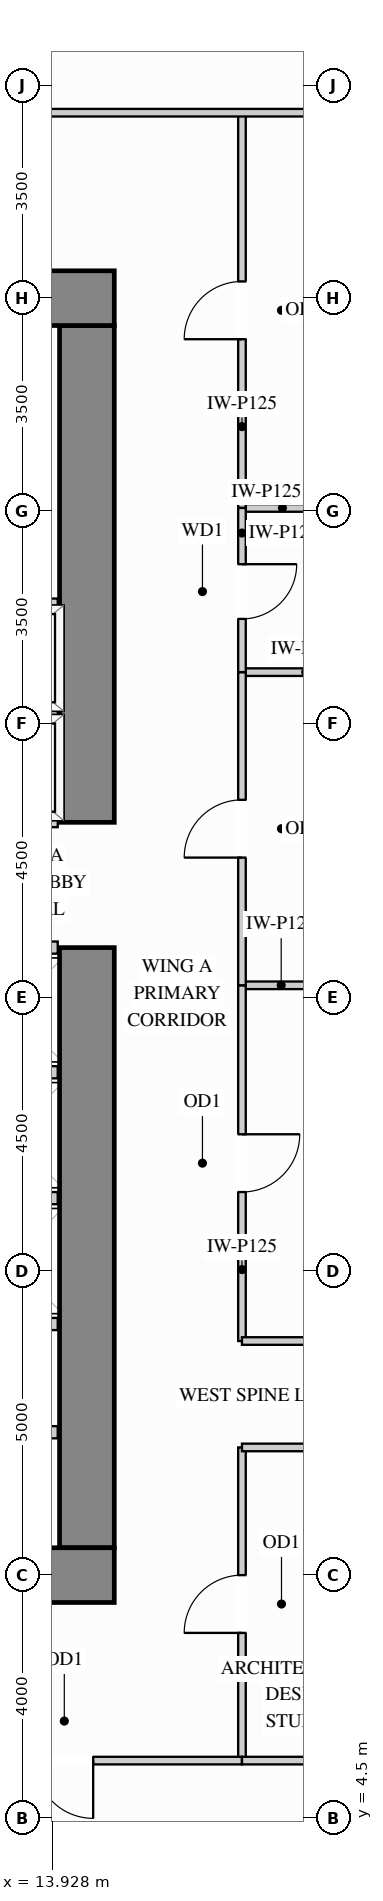
"""IFC4 building model, lengths in metres.
Left out: names, types, materials, properties, quantities, classifications, styles, units other than length and angle.
Written with IfcOpenShell. Run it as: python <this file> out.ifc"""

import sys

from ifc_helpers import new_model, si_unit, direction, frame, frame_2d, origin, place, context, subcontext, project, spatial, rectangle, extrude, source, transform, mapped, element, fill, save


model = new_model("IFC4")
c1 = context("Model", 3, precision=1e-05, world=origin(), true_north=direction((0.0, 1.0)))
c2 = subcontext(c1, "Body", "Model", "MODEL_VIEW")
j1 = project(units=[si_unit("LENGTHUNIT", "METRE"), si_unit("PLANEANGLEUNIT", "RADIAN")], contexts=[c1])
p1 = place(None, origin())
s1 = spatial("IfcSite", under=j1, at=p1, CompositionType="ELEMENT")
p2 = place(p1, origin())
s2 = spatial("IfcBuilding", under=s1, at=p2, CompositionType="ELEMENT")
p3 = place(p2, frame((0.0, 0.0, 26.1)))
s3 = spatial("IfcBuildingStorey", under=s2, at=p3, CompositionType="ELEMENT", Elevation=26.1)
m1 = source(origin(), c2, "Body", "SweptSolid", [
    extrude(rectangle(XDim=9.87, YDim=0.9, at=frame_2d((4.935, 0.0))), origin(), (0.0, 0.0, 1.0), 3.38),
])
p4 = place(p3, frame((14.5, 8.95, 0.0), z_axis=(0.0, 0.0, 1.0), x_axis=(0.0, 1.0, 0.0)))
e1 = element("IfcWall", 1, at=p4, inside=s3, PredefinedType="SHEAR", context=c2, shape_type="MappedRepresentation", body=[
    mapped(m1, transform((0.0, 0.0, 0.0), x_axis=(1.0, 0.0, 0.0), y_axis=(0.0, 1.0, 0.0), z_axis=(0.0, 0.0, 1.0))),
])
m2 = source(origin(), c2, "Body", "SweptSolid", [
    extrude(rectangle(XDim=8.17, YDim=0.9, at=frame_2d((4.085, 0.0))), origin(), (0.0, 0.0, 1.0), 3.38),
])
p5 = place(p3, frame((14.5, 20.88, 0.0), z_axis=(0.0, 0.0, 1.0), x_axis=(0.0, 1.0, 0.0)))
e2 = element("IfcWall", 2, at=p5, inside=s3, PredefinedType="SHEAR", context=c2, shape_type="MappedRepresentation", body=[
    mapped(m2, transform((0.0, 0.0, 0.0), x_axis=(1.0, 0.0, 0.0), y_axis=(0.0, 1.0, 0.0), z_axis=(0.0, 0.0, 1.0))),
])
m3 = source(origin(), c2, "Body", "SweptSolid", [
    extrude(rectangle(XDim=10.9, YDim=0.9, at=frame_2d((5.45, 0.0))), origin(), (0.0, 0.0, 1.0), 3.38),
])
for number, where, z_axis, x_axis in (
    (3, (4.05, 29.5, 0.0), (0.0, 0.0, 1.0), (1.0, 0.0, 0.0)),
    (4, (4.05, 8.5, 0.0), (0.0, 0.0, 1.0), (1.0, 0.0, 0.0)),
):
    element("IfcWall", number, at=place(p3, frame(where, z_axis=z_axis, x_axis=x_axis)), inside=s3, PredefinedType="SHEAR", context=c2, shape_type="MappedRepresentation", body=[
        mapped(m3, transform((0.0, 0.0, 0.0), x_axis=(1.0, 0.0, 0.0), y_axis=(0.0, 1.0, 0.0), z_axis=(0.0, 0.0, 1.0))),
    ])
m4 = source(origin(), c2, "Body", "SweptSolid", [
    extrude(rectangle(XDim=1.29, YDim=0.125, at=frame_2d((0.645, 0.0))), origin(), (0.0, 0.0, 1.0), 2.67),
])
p6 = place(p3, frame((17.05, 18.2, 0.0), z_axis=(0.0, 0.0, 1.0), x_axis=(1.0, 0.0, 0.0)))
e5 = element("IfcWall", 5, at=p6, inside=s3, PredefinedType="PARTITIONING", context=c2, shape_type="MappedRepresentation", body=[
    mapped(m4, transform((0.0, 0.0, 0.0), x_axis=(1.0, 0.0, 0.0), y_axis=(0.0, 1.0, 0.0), z_axis=(0.0, 0.0, 1.0))),
])
m5 = source(origin(), c2, "Body", "SweptSolid", [
    extrude(rectangle(XDim=2.098, YDim=0.125, at=frame_2d((1.049, 0.0))), origin(), (0.0, 0.0, 1.0), 3.365),
])
for number, where, z_axis, x_axis in (
    (6, (17.05, 23.35, 0.0), (0.0, 0.0, 1.0), (1.0, 0.0, 0.0)),
    (7, (17.05, 26.05, 0.0), (0.0, 0.0, 1.0), (1.0, 0.0, 0.0)),
):
    element("IfcWall", number, at=place(p3, frame(where, z_axis=z_axis, x_axis=x_axis)), inside=s3, PredefinedType="PARTITIONING", context=c2, shape_type="MappedRepresentation", body=[
        mapped(m5, transform((0.0, 0.0, 0.0), x_axis=(1.0, 0.0, 0.0), y_axis=(0.0, 1.0, 0.0), z_axis=(0.0, 0.0, 1.0))),
    ])
p7 = place(p3, frame((17.05, 12.35, 0.0), z_axis=(0.0, 0.0, 1.0), x_axis=(0.0, 1.0, 0.0)))
e8 = element("IfcWall", 8, at=p7, inside=s3, PredefinedType="PARTITIONING", context=c2, shape_type="SweptSolid", body=[
    extrude(rectangle(XDim=5.85, YDim=0.125, at=frame_2d((2.925, 0.0))), origin(), (0.0, 0.0, 1.0), 3.365),
])
p8 = place(p7, frame((2.45, 0.0, 0.0)))
e9 = element("IfcOpeningElement", 9, at=p8, cuts=e8, PredefinedType="OPENING", context=c2, shape_type="SweptSolid", body=[
    extrude(rectangle(XDim=0.95, YDim=2.15, at=frame_2d((0.475, 1.075))), frame((0.0, 0.073, 0.0), z_axis=(0.0, -1.0, 0.0), x_axis=(1.0, 0.0, 0.0)), (0.0, 0.0, 1.0), 0.145),
])
p9 = place(p3, frame((17.05, 18.2, 0.0), z_axis=(0.0, 0.0, 1.0), x_axis=(0.0, 1.0, 0.0)))
e10 = element("IfcWall", 10, at=p9, inside=s3, PredefinedType="PARTITIONING", context=c2, shape_type="SweptSolid", body=[
    extrude(rectangle(XDim=5.15, YDim=0.125, at=frame_2d((2.575, 0.0))), origin(), (0.0, 0.0, 1.0), 3.365),
])
p10 = place(p9, frame((2.1, 0.0, 0.0)))
e11 = element("IfcOpeningElement", 11, at=p10, cuts=e10, PredefinedType="OPENING", context=c2, shape_type="SweptSolid", body=[
    extrude(rectangle(XDim=0.95, YDim=2.15, at=frame_2d((0.475, 1.075))), frame((0.0, 0.073, 0.0), z_axis=(0.0, -1.0, 0.0), x_axis=(1.0, 0.0, 0.0)), (0.0, 0.0, 1.0), 0.145),
])
p11 = place(p3, frame((17.05, 26.05, 0.0), z_axis=(0.0, 0.0, 1.0), x_axis=(0.0, 1.0, 0.0)))
e12 = element("IfcWall", 12, at=p11, inside=s3, PredefinedType="PARTITIONING", context=c2, shape_type="SweptSolid", body=[
    extrude(rectangle(XDim=6.5, YDim=0.125, at=frame_2d((3.25, 0.0))), origin(), (0.0, 0.0, 1.0), 3.365),
])
p12 = place(p11, frame((2.775, 0.0, 0.0)))
e13 = element("IfcOpeningElement", 13, at=p12, cuts=e12, PredefinedType="OPENING", context=c2, shape_type="SweptSolid", body=[
    extrude(rectangle(XDim=0.95, YDim=2.15, at=frame_2d((0.475, 1.075))), frame((0.0, 0.073, 0.0), z_axis=(0.0, -1.0, 0.0), x_axis=(1.0, 0.0, 0.0)), (0.0, 0.0, 1.0), 0.145),
])
p13 = place(p3, frame((17.05, 5.45, 0.0), z_axis=(0.0, 0.0, 1.0), x_axis=(0.0, 1.0, 0.0)))
e14 = element("IfcWall", 14, at=p13, inside=s3, PredefinedType="PARTITIONING", context=c2, shape_type="SweptSolid", body=[
    extrude(rectangle(XDim=5.15, YDim=0.125, at=frame_2d((2.575, 0.0))), origin(), (0.0, 0.0, 1.0), 3.365),
])
p14 = place(p13, frame((2.1, 0.0, 0.0)))
e15 = element("IfcOpeningElement", 15, at=p14, cuts=e14, PredefinedType="OPENING", context=c2, shape_type="SweptSolid", body=[
    extrude(rectangle(XDim=0.95, YDim=2.15, at=frame_2d((0.475, 1.075))), frame((0.0, 0.073, 0.0), z_axis=(0.0, -1.0, 0.0), x_axis=(1.0, 0.0, 0.0)), (0.0, 0.0, 1.0), 0.145),
])
p15 = place(p3, frame((17.05, 23.35, 0.0), z_axis=(0.0, 0.0, 1.0), x_axis=(0.0, 1.0, 0.0)))
e16 = element("IfcWall", 16, at=p15, inside=s3, PredefinedType="PARTITIONING", context=c2, shape_type="SweptSolid", body=[
    extrude(rectangle(XDim=2.7, YDim=0.125, at=frame_2d((1.35, 0.0))), origin(), (0.0, 0.0, 1.0), 3.365),
])
p16 = place(p15, frame((0.875, 0.0, 0.0)))
e17 = element("IfcOpeningElement", 17, at=p16, cuts=e16, PredefinedType="OPENING", context=c2, shape_type="SweptSolid", body=[
    extrude(rectangle(XDim=0.9, YDim=2.15, at=frame_2d((0.45, 1.075))), frame((0.0, 0.073, 0.0), z_axis=(0.0, -1.0, 0.0), x_axis=(1.0, 0.0, 0.0)), (0.0, 0.0, 1.0), 0.145),
])
m6 = source(origin(), c2, "Body", "SweptSolid", [
    extrude(rectangle(XDim=5.798, YDim=0.125, at=frame_2d((2.899, 0.0))), origin(), (0.0, 0.0, 1.0), 3.365),
])
p17 = place(p3, frame((13.35, 32.55, 0.0), z_axis=(0.0, 0.0, 1.0), x_axis=(1.0, 0.0, 0.0)))
e18 = element("IfcWall", 18, at=p17, inside=s3, PredefinedType="PARTITIONING", context=c2, shape_type="MappedRepresentation", body=[
    mapped(m6, transform((0.0, 0.0, 0.0), x_axis=(1.0, 0.0, 0.0), y_axis=(0.0, 1.0, 0.0), z_axis=(0.0, 0.0, 1.0))),
])
m7 = source(origin(), c2, "Body", "SweptSolid", [
    extrude(rectangle(XDim=2.45, YDim=0.125, at=frame_2d((1.225, 0.0))), origin(), (0.0, 0.0, 1.0), 3.365),
])
for number, where, z_axis, x_axis in (
    (19, (17.05, 12.35, 0.0), (0.0, 0.0, 1.0), (1.0, 0.0, 0.0)),
    (20, (17.05, 10.6, 0.0), (0.0, 0.0, 1.0), (1.0, 0.0, 0.0)),
):
    element("IfcWall", number, at=place(p3, frame(where, z_axis=z_axis, x_axis=x_axis)), inside=s3, PredefinedType="PARTITIONING", context=c2, shape_type="MappedRepresentation", body=[
        mapped(m7, transform((0.0, 0.0, 0.0), x_axis=(1.0, 0.0, 0.0), y_axis=(0.0, 1.0, 0.0), z_axis=(0.0, 0.0, 1.0))),
    ])
p18 = place(p3, frame((11.206, 5.45, 0.0), z_axis=(0.0, 0.0, 1.0), x_axis=(1.0, 0.0, 0.0)))
e21 = element("IfcWall", 21, at=p18, inside=s3, PredefinedType="PARTITIONING", context=c2, shape_type="SweptSolid", body=[
    extrude(rectangle(XDim=5.844, YDim=0.125, at=frame_2d((2.922, 0.0))), origin(), (0.0, 0.0, 1.0), 3.365),
])
p19 = place(p18, frame((2.447, 0.0, 0.0)))
e22 = element("IfcOpeningElement", 22, at=p19, cuts=e21, PredefinedType="OPENING", context=c2, shape_type="SweptSolid", body=[
    extrude(rectangle(XDim=0.95, YDim=2.15, at=frame_2d((0.475, 1.075))), frame((0.0, 0.073, 0.0), z_axis=(0.0, -1.0, 0.0), x_axis=(1.0, 0.0, 0.0)), (0.0, 0.0, 1.0), 0.145),
])
p20 = place(p3, frame((17.05, 5.45, 0.0), z_axis=(0.0, 0.0, 1.0), x_axis=(1.0, 0.0, 0.0)))
e23 = element("IfcWall", 23, at=p20, inside=s3, PredefinedType="PARTITIONING", context=c2, shape_type="MappedRepresentation", body=[
    mapped(m5, transform((0.0, 0.0, 0.0), x_axis=(1.0, 0.0, 0.0), y_axis=(0.0, 1.0, 0.0), z_axis=(0.0, 0.0, 1.0))),
])
m8 = source(origin(), c2, "Body", "SweptSolid", [
    extrude(rectangle(XDim=1.6, YDim=0.2, at=frame_2d((0.8, 0.0))), origin(), (0.0, 0.0, 1.0), 3.365),
])
p21 = place(p3, frame((12.42, 10.85, 0.0), z_axis=(0.0, 0.0, 1.0), x_axis=(1.0, 0.0, 0.0)))
e24 = element("IfcWall", 24, at=p21, inside=s3, PredefinedType="PARTITIONING", context=c2, shape_type="MappedRepresentation", body=[
    mapped(m8, transform((0.0, 0.0, 0.0), x_axis=(1.0, 0.0, 0.0), y_axis=(0.0, 1.0, 0.0), z_axis=(0.0, 0.0, 1.0))),
])
m9 = source(origin(), c2, "Body", "SweptSolid", [
    extrude(rectangle(XDim=2.19, YDim=0.2, at=frame_2d((1.095, 0.0))), origin(), (0.0, 0.0, 1.0), 3.365),
])
for number, where, z_axis, x_axis in (
    (25, (11.83, 22.66, 0.0), (0.0, 0.0, 1.0), (1.0, 0.0, 0.0)),
    (26, (11.83, 20.9, 0.0), (0.0, 0.0, 1.0), (1.0, 0.0, 0.0)),
    (27, (11.83, 24.46, 0.0), (0.0, 0.0, 1.0), (1.0, 0.0, 0.0)),
):
    element("IfcWall", number, at=place(p3, frame(where, z_axis=z_axis, x_axis=x_axis)), inside=s3, PredefinedType="PARTITIONING", context=c2, shape_type="MappedRepresentation", body=[
        mapped(m9, transform((0.0, 0.0, 0.0), x_axis=(1.0, 0.0, 0.0), y_axis=(0.0, 1.0, 0.0), z_axis=(0.0, 0.0, 1.0))),
    ])
m10 = source(origin(), c2, "Body", "SweptSolid", [
    extrude(rectangle(XDim=1.79, YDim=0.2, at=frame_2d((0.895, 0.0))), origin(), (0.0, 0.0, 1.0), 3.365),
])
for number, where, z_axis, x_axis in (
    (28, (12.23, 14.7, 0.0), (0.0, 0.0, 1.0), (1.0, 0.0, 0.0)),
    (29, (12.23, 12.63, 0.0), (0.0, 0.0, 1.0), (1.0, 0.0, 0.0)),
    (30, (12.23, 16.77, 0.0), (0.0, 0.0, 1.0), (1.0, 0.0, 0.0)),
    (31, (12.23, 18.82, 0.0), (0.0, 0.0, 1.0), (1.0, 0.0, 0.0)),
):
    element("IfcWall", number, at=place(p3, frame(where, z_axis=z_axis, x_axis=x_axis)), inside=s3, PredefinedType="PARTITIONING", context=c2, shape_type="MappedRepresentation", body=[
        mapped(m10, transform((0.0, 0.0, 0.0), x_axis=(1.0, 0.0, 0.0), y_axis=(0.0, 1.0, 0.0), z_axis=(0.0, 0.0, 1.0))),
    ])
m11 = source(origin(), c2, "Body", "SweptSolid", [
    extrude(rectangle(XDim=0.95, YDim=2.15, at=frame_2d((0.475, 1.075))), frame((0.0, 0.025, 0.0), z_axis=(0.0, -1.0, 0.0), x_axis=(1.0, 0.0, 0.0)), (0.0, 0.0, 1.0), 0.05),
])
p22 = place(p14, origin())
e32 = element("IfcDoor", 32, at=p22, inside=s3, OperationType="SINGLE_SWING_LEFT", PredefinedType="DOOR", context=c2, shape_type="MappedRepresentation", body=[
    mapped(m11, transform((0.0, 0.0, 0.0), x_axis=(1.0, 0.0, 0.0), y_axis=(0.0, 1.0, 0.0), z_axis=(0.0, 0.0, 1.0))),
])
fill(e15, e32)
p23 = place(p8, origin())
e33 = element("IfcDoor", 33, at=p23, inside=s3, OperationType="SINGLE_SWING_RIGHT", PredefinedType="DOOR", context=c2, shape_type="MappedRepresentation", body=[
    mapped(m11, transform((0.0, 0.0, 0.0), x_axis=(1.0, 0.0, 0.0), y_axis=(0.0, 1.0, 0.0), z_axis=(0.0, 0.0, 1.0))),
])
fill(e9, e33)
p24 = place(p10, origin())
e34 = element("IfcDoor", 34, at=p24, inside=s3, OperationType="SINGLE_SWING_LEFT", PredefinedType="DOOR", context=c2, shape_type="MappedRepresentation", body=[
    mapped(m11, transform((0.0, 0.0, 0.0), x_axis=(1.0, 0.0, 0.0), y_axis=(0.0, 1.0, 0.0), z_axis=(0.0, 0.0, 1.0))),
])
fill(e11, e34)
p25 = place(p12, origin())
e35 = element("IfcDoor", 35, at=p25, inside=s3, OperationType="SINGLE_SWING_LEFT", PredefinedType="DOOR", context=c2, shape_type="MappedRepresentation", body=[
    mapped(m11, transform((0.0, 0.0, 0.0), x_axis=(1.0, 0.0, 0.0), y_axis=(0.0, 1.0, 0.0), z_axis=(0.0, 0.0, 1.0))),
])
fill(e13, e35)
p26 = place(p19, origin())
e36 = element("IfcDoor", 36, at=p26, inside=s3, OperationType="SINGLE_SWING_RIGHT", PredefinedType="DOOR", context=c2, shape_type="MappedRepresentation", body=[
    mapped(m11, transform((0.0, 0.0, 0.0), x_axis=(1.0, 0.0, 0.0), y_axis=(0.0, 1.0, 0.0), z_axis=(0.0, 0.0, 1.0))),
])
fill(e22, e36)
m12 = source(origin(), c2, "Body", "SweptSolid", [
    extrude(rectangle(XDim=0.9, YDim=2.15, at=frame_2d((0.45, 1.075))), frame((0.0, 0.025, 0.0), z_axis=(0.0, -1.0, 0.0), x_axis=(1.0, 0.0, 0.0)), (0.0, 0.0, 1.0), 0.05),
])
p27 = place(p16, origin())
e37 = element("IfcDoor", 37, at=p27, inside=s3, OperationType="SINGLE_SWING_RIGHT", PredefinedType="DOOR", context=c2, shape_type="MappedRepresentation", body=[
    mapped(m12, transform((0.0, 0.0, 0.0), x_axis=(1.0, 0.0, 0.0), y_axis=(0.0, 1.0, 0.0), z_axis=(0.0, 0.0, 1.0))),
])
fill(e17, e37)
save(model, sys.argv[1])
